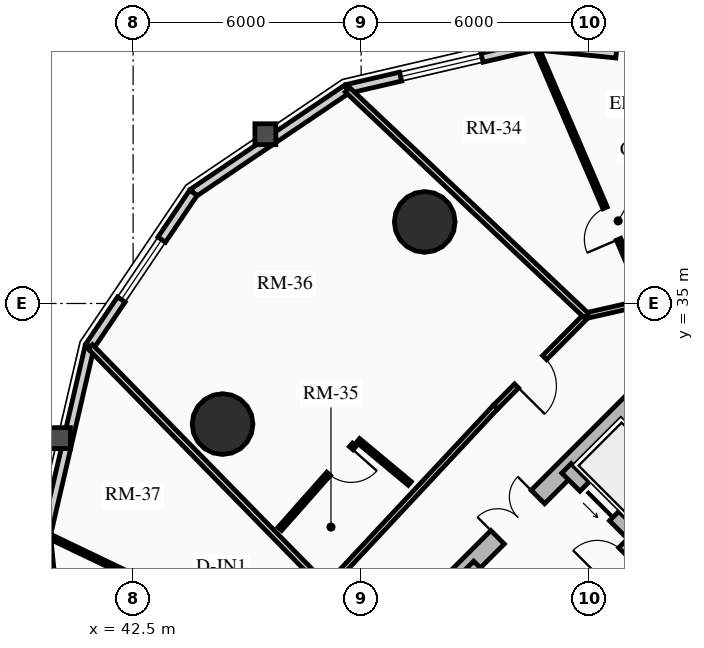
"""IFC4 building model, lengths in metres.
Left out: names, types, materials, properties, quantities, classifications, styles, units other than length and angle.
Written with IfcOpenShell. Run it as: python <this file> out.ifc"""

import sys

from ifc_helpers import new_model, si_unit, direction, frame, frame_2d, origin, origin_2d, place, context, subcontext, project, spatial, rectangle, circle, extrude, source, transform, mapped, element, fill, save


model = new_model("IFC4")
c1 = context("Model", 3, precision=1e-05, world=origin(), true_north=direction((0.0, 1.0)))
c2 = subcontext(c1, "Body", "Model", "MODEL_VIEW")
j1 = project(units=[si_unit("LENGTHUNIT", "METRE"), si_unit("PLANEANGLEUNIT", "RADIAN")], contexts=[c1])
p1 = place(None, origin())
s1 = spatial("IfcSite", under=j1, at=p1, CompositionType="ELEMENT")
p2 = place(p1, origin())
s2 = spatial("IfcBuilding", under=s1, at=p2, CompositionType="ELEMENT")
p3 = place(p2, frame((0.0, 0.0, 33.64)))
s3 = spatial("IfcBuildingStorey", under=s2, at=p3, CompositionType="ELEMENT", Elevation=33.64)
p4 = place(p3, frame((48.838, 25.596, 0.0), z_axis=(0.0, 0.0, 1.0), x_axis=(0.707106781187, 0.707106781187, 0.0)))
e1 = element("IfcWall", 1, at=p4, inside=s3, PredefinedType="SHEAR", context=c2, shape_type="SweptSolid", body=[
    extrude(rectangle(XDim=10.7, YDim=0.5, at=frame_2d((5.35, 0.0))), origin(), (0.0, 0.0, 1.0), 2.91),
])
m1 = source(origin(), c2, "Body", "SweptSolid", [
    extrude(rectangle(XDim=1.5, YDim=2.02, at=frame_2d((0.75, 1.01))), frame((0.0, 0.26, 0.0), z_axis=(0.0, -1.0, 0.0), x_axis=(1.0, 0.0, 0.0)), (0.0, 0.0, 1.0), 0.52),
])
p5 = place(p4, frame((4.6, 0.0, 0.0)))
e2 = element("IfcOpeningElement", 2, at=p5, cuts=e1, PredefinedType="OPENING", context=c2, shape_type="MappedRepresentation", body=[
    mapped(m1, transform((0.0, 0.0, 0.0), x_axis=(1.0, 0.0, 0.0), y_axis=(0.0, 1.0, 0.0), z_axis=(0.0, 0.0, 1.0), scale=1.0)),
])
p6 = place(p3, frame((61.096, 18.338, 0.0), z_axis=(0.0, 0.0, 1.0), x_axis=(-0.707106781187, 0.707106781187, 0.0)))
e3 = element("IfcWall", 3, at=p6, inside=s3, PredefinedType="SHEAR", context=c2, shape_type="SweptSolid", body=[
    extrude(rectangle(XDim=13.8, YDim=0.35, at=frame_2d((6.9, 0.0))), origin(), (0.0, 0.0, 1.0), 2.91),
])
m2 = source(origin(), c2, "Body", "SweptSolid", [
    extrude(rectangle(XDim=1.1, YDim=2.015, at=frame_2d((0.55, 1.007))), frame((0.0, 0.185, 0.0), z_axis=(0.0, -1.0, 0.0), x_axis=(1.0, 0.0, 0.0)), (0.0, 0.0, 1.0), 0.37),
])
p7 = place(p6, frame((4.9, 0.0, 0.0)))
e4 = element("IfcOpeningElement", 4, at=p7, cuts=e3, PredefinedType="OPENING", context=c2, shape_type="MappedRepresentation", body=[
    mapped(m2, transform((0.0, 0.0, 0.0), x_axis=(1.0, 0.0, 0.0), y_axis=(0.0, 1.0, 0.0), z_axis=(0.0, 0.0, 1.0), scale=1.0)),
])
m3 = source(origin(), c2, "Body", "SweptSolid", [
    extrude(rectangle(XDim=1.15, YDim=2.02, at=frame_2d((0.575, 1.01))), frame((0.0, 0.185, 0.0), z_axis=(0.0, -1.0, 0.0), x_axis=(1.0, 0.0, 0.0)), (0.0, 0.0, 1.0), 0.37),
])
p8 = place(p6, frame((7.32, 0.0, 0.0)))
e5 = element("IfcOpeningElement", 5, at=p8, cuts=e3, PredefinedType="OPENING", context=c2, shape_type="MappedRepresentation", body=[
    mapped(m3, transform((0.0, 0.0, 0.0), x_axis=(1.0, 0.0, 0.0), y_axis=(0.0, 1.0, 0.0), z_axis=(0.0, 0.0, 1.0), scale=1.0)),
])
p9 = place(p3, frame((63.662, 20.904, 0.0), z_axis=(0.0, 0.0, 1.0), x_axis=(-0.707106781187, 0.707106781187, 0.0)))
e6 = element("IfcWall", 6, at=p9, inside=s3, PredefinedType="SHEAR", context=c2, shape_type="SweptSolid", body=[
    extrude(rectangle(XDim=13.8, YDim=0.35, at=frame_2d((6.9, 0.0))), origin(), (0.0, 0.0, 1.0), 2.91),
])
p10 = place(p9, frame((10.025, 0.0, 0.0)))
e7 = element("IfcOpeningElement", 7, at=p10, cuts=e6, PredefinedType="OPENING", context=c2, shape_type="MappedRepresentation", body=[
    mapped(m2, transform((0.0, 0.0, 0.0), x_axis=(1.0, 0.0, 0.0), y_axis=(0.0, 1.0, 0.0), z_axis=(0.0, 0.0, 1.0), scale=1.0)),
])
p11 = place(p9, frame((12.025, 0.0, 0.0)))
e8 = element("IfcOpeningElement", 8, at=p11, cuts=e6, PredefinedType="OPENING", context=c2, shape_type="MappedRepresentation", body=[
    mapped(m2, transform((0.0, 0.0, 0.0), x_axis=(1.0, 0.0, 0.0), y_axis=(0.0, 1.0, 0.0), z_axis=(0.0, 0.0, 1.0), scale=1.0)),
])
p12 = place(p9, frame((5.33, 0.0, 0.0)))
e9 = element("IfcOpeningElement", 9, at=p12, cuts=e6, PredefinedType="OPENING", context=c2, shape_type="MappedRepresentation", body=[
    mapped(m3, transform((0.0, 0.0, 0.0), x_axis=(1.0, 0.0, 0.0), y_axis=(0.0, 1.0, 0.0), z_axis=(0.0, 0.0, 1.0), scale=1.0)),
])
for number, where, z_axis, x_axis in (
    (10, (50.173, 37.146, 0.0), (0.0, 0.0, 1.0), (1.0, 0.0, 0.0)),
    (11, (44.854, 31.827, 0.0), (0.0, 0.0, 1.0), (1.0, 0.0, 0.0)),
):
    element("IfcColumn", number, at=place(p3, frame(where, z_axis=z_axis, x_axis=x_axis)), inside=s3, PredefinedType="USERDEFINED", context=c2, shape_type="SweptSolid", body=[
        extrude(circle(Radius=0.8, at=origin_2d()), origin(), (0.0, 0.0, 1.0), 2.91),
    ])
p13 = place(p3, frame((53.09, 41.794, 0.0), z_axis=(0.0, 0.0, 1.0), x_axis=(0.994968263437, -0.100190592135, 0.0)))
e12 = element("IfcWall", 12, at=p13, inside=s3, PredefinedType="SOLIDWALL", context=c2, shape_type="SweptSolid", body=[
    extrude(rectangle(XDim=5.419, YDim=0.24, at=frame_2d((2.71, 0.0))), origin(), (0.0, 0.0, 1.0), 2.073),
])
m4 = source(origin(), c2, "Body", "SweptSolid", [
    extrude(rectangle(XDim=1.15, YDim=2.005, at=frame_2d((0.575, 1.002))), frame((0.0, 0.13, 0.0), z_axis=(0.0, -1.0, 0.0), x_axis=(1.0, 0.0, 0.0)), (0.0, 0.0, 1.0), 0.26),
])
p14 = place(p13, frame((2.135, 0.0, 0.0)))
e13 = element("IfcOpeningElement", 13, at=p14, cuts=e12, PredefinedType="OPENING", context=c2, shape_type="MappedRepresentation", body=[
    mapped(m4, transform((0.0, 0.0, 0.0), x_axis=(1.0, 0.0, 0.0), y_axis=(0.0, 1.0, 0.0), z_axis=(0.0, 0.0, 1.0), scale=1.0)),
])
p15 = place(p3, frame((48.129, 40.644, 0.0), z_axis=(0.0, 0.0, 1.0), x_axis=(0.974167686491, 0.22582585901, 0.0)))
e14 = element("IfcWall", 14, at=p15, inside=s3, PredefinedType="SOLIDWALL", context=c2, shape_type="SweptSolid", body=[
    extrude(rectangle(XDim=5.092, YDim=0.24, at=frame_2d((2.546, 0.0))), origin(), (0.0, 0.0, 1.0), 2.073),
])
m5 = source(origin(), c2, "Body", "SweptSolid", [
    extrude(rectangle(XDim=2.2, YDim=1.35, at=frame_2d((1.1, 0.675))), frame((0.0, 0.13, 0.0), z_axis=(0.0, -1.0, 0.0), x_axis=(1.0, 0.0, 0.0)), (0.0, 0.0, 1.0), 0.26),
])
p16 = place(p15, frame((1.446, 0.0, 0.65)))
e15 = element("IfcOpeningElement", 15, at=p16, cuts=e14, PredefinedType="OPENING", context=c2, shape_type="MappedRepresentation", body=[
    mapped(m5, transform((0.0, 0.0, 0.0), x_axis=(1.0, 0.0, 0.0), y_axis=(0.0, 1.0, 0.0), z_axis=(0.0, 0.0, 1.0), scale=1.0)),
])
p17 = place(p3, frame((44.086, 37.914, 0.0), z_axis=(0.0, 0.0, 1.0), x_axis=(0.828748297084, 0.559621532896, 0.0)))
e16 = element("IfcWall", 16, at=p17, inside=s3, PredefinedType="SOLIDWALL", context=c2, shape_type="SweptSolid", body=[
    extrude(rectangle(XDim=4.879, YDim=0.24, at=frame_2d((2.439, 0.0))), origin(), (0.0, 0.0, 1.0), 2.073),
])
p18 = place(p3, frame((41.356, 33.871, 0.0), z_axis=(0.0, 0.0, 1.0), x_axis=(0.559621532896, 0.828748297084, 0.0)))
e17 = element("IfcWall", 17, at=p18, inside=s3, PredefinedType="SOLIDWALL", context=c2, shape_type="SweptSolid", body=[
    extrude(rectangle(XDim=4.879, YDim=0.24, at=frame_2d((2.439, 0.0))), origin(), (0.0, 0.0, 1.0), 2.073),
])
m6 = source(origin(), c2, "Body", "SweptSolid", [
    extrude(rectangle(XDim=1.9, YDim=1.35, at=frame_2d((0.95, 0.675))), frame((0.0, 0.13, 0.0), z_axis=(0.0, -1.0, 0.0), x_axis=(1.0, 0.0, 0.0)), (0.0, 0.0, 1.0), 0.26),
])
p19 = place(p18, frame((1.489, 0.0, 0.65)))
e18 = element("IfcOpeningElement", 18, at=p19, cuts=e17, PredefinedType="OPENING", context=c2, shape_type="MappedRepresentation", body=[
    mapped(m6, transform((0.0, 0.0, 0.0), x_axis=(1.0, 0.0, 0.0), y_axis=(0.0, 1.0, 0.0), z_axis=(0.0, 0.0, 1.0), scale=1.0)),
])
p20 = place(p3, frame((40.206, 28.91, 0.0), z_axis=(0.0, 0.0, 1.0), x_axis=(0.22582585901, 0.974167686491, 0.0)))
e19 = element("IfcWall", 19, at=p20, inside=s3, PredefinedType="SOLIDWALL", context=c2, shape_type="SweptSolid", body=[
    extrude(rectangle(XDim=5.092, YDim=0.24, at=frame_2d((2.546, 0.0))), origin(), (0.0, 0.0, 1.0), 2.073),
])
p21 = place(p3, frame((40.749, 23.518, 0.0), z_axis=(0.0, 0.0, 1.0), x_axis=(-0.100190592135, 0.994968263437, 0.0)))
e20 = element("IfcWall", 20, at=p21, inside=s3, PredefinedType="SOLIDWALL", context=c2, shape_type="SweptSolid", body=[
    extrude(rectangle(XDim=5.419, YDim=0.24, at=frame_2d((2.71, 0.0))), origin(), (0.0, 0.0, 1.0), 2.073),
])
p22 = place(p21, frame((1.76, 0.0, 0.65)))
e21 = element("IfcOpeningElement", 21, at=p22, cuts=e20, PredefinedType="OPENING", context=c2, shape_type="MappedRepresentation", body=[
    mapped(m6, transform((0.0, 0.0, 0.0), x_axis=(1.0, 0.0, 0.0), y_axis=(0.0, 1.0, 0.0), z_axis=(0.0, 0.0, 1.0), scale=1.0)),
])
p23 = place(p3, frame((53.264, 26.416, 0.0), z_axis=(0.0, 0.0, 1.0), x_axis=(0.707106781187, 0.707106781187, 0.0)))
e22 = element("IfcWall", 22, at=p23, inside=s3, PredefinedType="PARTITIONING", context=c2, shape_type="SweptSolid", body=[
    extrude(rectangle(XDim=3.28, YDim=0.2, at=frame_2d((1.64, 0.0))), origin(), (0.0, 0.0, 1.0), 2.635),
])
m7 = source(origin(), c2, "Body", "SweptSolid", [
    extrude(rectangle(XDim=1.0, YDim=2.015, at=frame_2d((0.5, 1.007))), frame((0.0, 0.11, 0.0), z_axis=(0.0, -1.0, 0.0), x_axis=(1.0, 0.0, 0.0)), (0.0, 0.0, 1.0), 0.22),
])
p24 = place(p23, frame((0.14, 0.0, 0.0)))
e23 = element("IfcOpeningElement", 23, at=p24, cuts=e22, PredefinedType="OPENING", context=c2, shape_type="MappedRepresentation", body=[
    mapped(m7, transform((0.0, 0.0, 0.0), x_axis=(1.0, 0.0, 0.0), y_axis=(0.0, 1.0, 0.0), z_axis=(0.0, 0.0, 1.0), scale=1.0)),
])
m8 = source(origin(), c2, "Body", "SweptSolid", [
    extrude(rectangle(XDim=0.9, YDim=2.005, at=frame_2d((0.45, 1.002))), frame((0.0, 0.11, 0.0), z_axis=(0.0, -1.0, 0.0), x_axis=(1.0, 0.0, 0.0)), (0.0, 0.0, 1.0), 0.22),
])
p25 = place(p23, frame((2.05, 0.0, 0.0)))
e24 = element("IfcOpeningElement", 24, at=p25, cuts=e22, PredefinedType="OPENING", context=c2, shape_type="MappedRepresentation", body=[
    mapped(m8, transform((0.0, 0.0, 0.0), x_axis=(1.0, 0.0, 0.0), y_axis=(0.0, 1.0, 0.0), z_axis=(0.0, 0.0, 1.0), scale=1.0)),
])
p26 = place(p3, frame((55.984, 35.035, 0.0), z_axis=(0.0, 0.0, 1.0), x_axis=(-0.975290305708, -0.22092718165, 0.0)))
e25 = element("IfcWall", 25, at=p26, inside=s3, PredefinedType="PARTITIONING", context=c2, shape_type="SweptSolid", body=[
    extrude(rectangle(XDim=1.597, YDim=0.15, at=frame_2d((0.798, 0.0))), origin(), (0.0, 0.0, 1.0), 2.205),
])
p27 = place(p3, frame((54.427, 34.683, 0.0), z_axis=(0.0, 0.0, 1.0), x_axis=(-0.704178989986, -0.710022499687, 0.0)))
e26 = element("IfcWall", 26, at=p27, inside=s3, PredefinedType="PARTITIONING", context=c2, shape_type="SweptSolid", body=[
    extrude(rectangle(XDim=3.384, YDim=0.15, at=frame_2d((1.692, 0.0))), origin(), (0.0, 0.0, 1.0), 2.159),
])
m9 = source(origin(), c2, "Body", "SweptSolid", [
    extrude(rectangle(XDim=1.05, YDim=2.015, at=frame_2d((0.525, 1.007))), frame((0.0, 0.085, 0.0), z_axis=(0.0, -1.0, 0.0), x_axis=(1.0, 0.0, 0.0)), (0.0, 0.0, 1.0), 0.17),
])
p28 = place(p27, frame((1.56, 0.0, 0.0)))
e27 = element("IfcOpeningElement", 27, at=p28, cuts=e26, PredefinedType="OPENING", context=c2, shape_type="MappedRepresentation", body=[
    mapped(m9, transform((0.0, 0.0, 0.0), x_axis=(1.0, 0.0, 0.0), y_axis=(0.0, 1.0, 0.0), z_axis=(0.0, 0.0, 1.0), scale=1.0)),
])
p29 = place(p3, frame((52.043, 32.28, 0.0), z_axis=(0.0, 0.0, 1.0), x_axis=(-0.682606081633, -0.730786519661, 0.0)))
e28 = element("IfcWall", 28, at=p29, inside=s3, PredefinedType="PARTITIONING", context=c2, shape_type="SweptSolid", body=[
    extrude(rectangle(XDim=6.527, YDim=0.15, at=frame_2d((3.263, 0.0))), origin(), (0.0, 0.0, 1.0), 2.159),
])
p30 = place(p3, frame((54.427, 34.683, 0.0), z_axis=(0.0, 0.0, 1.0), x_axis=(-0.726732956694, 0.686920089716, 0.0)))
e29 = element("IfcWall", 29, at=p30, inside=s3, PredefinedType="PARTITIONING", context=c2, shape_type="SweptSolid", body=[
    extrude(rectangle(XDim=8.653, YDim=0.16, at=frame_2d((4.326, 0.0))), origin(), (0.0, 0.0, 1.0), 2.073),
])
p31 = place(p3, frame((47.588, 27.51, 0.0), z_axis=(0.0, 0.0, 1.0), x_axis=(-0.699371977892, 0.714757886657, 0.0)))
e30 = element("IfcWall", 30, at=p31, inside=s3, PredefinedType="PARTITIONING", context=c2, shape_type="SweptSolid", body=[
    extrude(rectangle(XDim=8.886, YDim=0.16, at=frame_2d((4.443, 0.0))), origin(), (0.0, 0.0, 1.0), 2.073),
])
p32 = place(p3, frame((55.984, 35.035, 0.0), z_axis=(0.0, 0.0, 1.0), x_axis=(-0.394244760106, 0.919005478291, 0.0)))
e31 = element("IfcWall", 31, at=p32, inside=s3, PredefinedType="PARTITIONING", context=c2, shape_type="SweptSolid", body=[
    extrude(rectangle(XDim=7.333, YDim=0.125, at=frame_2d((3.667, 0.0))), origin(), (0.0, 0.0, 1.0), 2.073),
])
m10 = source(origin(), c2, "Body", "SweptSolid", [
    extrude(rectangle(XDim=0.9, YDim=2.005, at=frame_2d((0.45, 1.002))), frame((0.0, 0.073, 0.0), z_axis=(0.0, -1.0, 0.0), x_axis=(1.0, 0.0, 0.0)), (0.0, 0.0, 1.0), 0.145),
])
p33 = place(p32, frame((1.8, 0.0, 0.0)))
e32 = element("IfcOpeningElement", 32, at=p33, cuts=e31, PredefinedType="OPENING", context=c2, shape_type="MappedRepresentation", body=[
    mapped(m10, transform((0.0, 0.0, 0.0), x_axis=(1.0, 0.0, 0.0), y_axis=(0.0, 1.0, 0.0), z_axis=(0.0, 0.0, 1.0), scale=1.0)),
])
p34 = place(p3, frame((49.78, 30.264, 0.0), z_axis=(0.0, 0.0, 1.0), x_axis=(-0.768209972595, 0.640197967824, 0.0)))
e33 = element("IfcWall", 33, at=p34, inside=s3, PredefinedType="PARTITIONING", context=c2, shape_type="SweptSolid", body=[
    extrude(rectangle(XDim=1.77, YDim=0.125, at=frame_2d((0.885, 0.0))), origin(), (0.0, 0.0, 1.0), 2.635),
])
p35 = place(p3, frame((48.318, 31.282, 0.0), z_axis=(0.0, 0.0, 1.0), x_axis=(-0.662365127428, -0.749181178333, 0.0)))
e34 = element("IfcWall", 34, at=p35, inside=s3, PredefinedType="PARTITIONING", context=c2, shape_type="SweptSolid", body=[
    extrude(rectangle(XDim=2.953, YDim=0.125, at=frame_2d((1.477, 0.0))), origin(), (0.0, 0.0, 1.0), 2.159),
])
p36 = place(p35, frame((0.12, 0.0, 0.0)))
e35 = element("IfcOpeningElement", 35, at=p36, cuts=e34, PredefinedType="OPENING", context=c2, shape_type="MappedRepresentation", body=[
    mapped(m10, transform((0.0, 0.0, 0.0), x_axis=(1.0, 0.0, 0.0), y_axis=(0.0, 1.0, 0.0), z_axis=(0.0, 0.0, 1.0), scale=1.0)),
])
p37 = place(p3, frame((46.543, 25.882, 0.0), z_axis=(0.0, 0.0, 1.0), x_axis=(-0.901937110034, 0.431867398103, 0.0)))
e36 = element("IfcWall", 36, at=p37, inside=s3, PredefinedType="PARTITIONING", context=c2, shape_type="SweptSolid", body=[
    extrude(rectangle(XDim=7.004, YDim=0.125, at=frame_2d((3.502, 0.0))), origin(), (0.0, 0.0, 1.0), 2.073),
])
p38 = place(p37, frame((1.8, 0.0, 0.0)))
e37 = element("IfcOpeningElement", 37, at=p38, cuts=e36, PredefinedType="OPENING", context=c2, shape_type="MappedRepresentation", body=[
    mapped(m10, transform((0.0, 0.0, 0.0), x_axis=(1.0, 0.0, 0.0), y_axis=(0.0, 1.0, 0.0), z_axis=(0.0, 0.0, 1.0), scale=1.0)),
])
m11 = source(origin(), c2, "Body", "SweptSolid", [
    extrude(rectangle(XDim=1.15, YDim=2.005, at=frame_2d((0.575, 1.002))), frame((0.0, 0.025, 0.0), z_axis=(0.0, -1.0, 0.0), x_axis=(1.0, 0.0, 0.0)), (0.0, 0.0, 1.0), 0.05),
])
p39 = place(p14, origin())
e38 = element("IfcDoor", 38, at=p39, inside=s3, OperationType="SINGLE_SWING_LEFT", PredefinedType="DOOR", context=c2, shape_type="MappedRepresentation", body=[
    mapped(m11, transform((0.0, 0.0, 0.0), x_axis=(1.0, 0.0, 0.0), y_axis=(0.0, 1.0, 0.0), z_axis=(0.0, 0.0, 1.0), scale=1.0)),
])
fill(e13, e38)
m12 = source(origin(), c2, "Body", "SweptSolid", [
    extrude(rectangle(XDim=2.2, YDim=1.35, at=frame_2d((1.1, 0.675))), frame((0.0, 0.03, 0.0), z_axis=(0.0, -1.0, 0.0), x_axis=(1.0, 0.0, 0.0)), (0.0, 0.0, 1.0), 0.06),
])
p40 = place(p16, origin())
e39 = element("IfcWindow", 39, at=p40, inside=s3, PartitioningType="DOUBLE_PANEL_VERTICAL", PredefinedType="WINDOW", context=c2, shape_type="MappedRepresentation", body=[
    mapped(m12, transform((0.0, 0.0, 0.0), x_axis=(1.0, 0.0, 0.0), y_axis=(0.0, 1.0, 0.0), z_axis=(0.0, 0.0, 1.0), scale=1.0)),
])
fill(e15, e39)
m13 = source(origin(), c2, "Body", "SweptSolid", [
    extrude(rectangle(XDim=1.9, YDim=1.35, at=frame_2d((0.95, 0.675))), frame((0.0, 0.03, 0.0), z_axis=(0.0, -1.0, 0.0), x_axis=(1.0, 0.0, 0.0)), (0.0, 0.0, 1.0), 0.06),
])
p41 = place(p19, origin())
e40 = element("IfcWindow", 40, at=p41, inside=s3, PartitioningType="DOUBLE_PANEL_VERTICAL", PredefinedType="WINDOW", context=c2, shape_type="MappedRepresentation", body=[
    mapped(m13, transform((0.0, 0.0, 0.0), x_axis=(1.0, 0.0, 0.0), y_axis=(0.0, 1.0, 0.0), z_axis=(0.0, 0.0, 1.0), scale=1.0)),
])
fill(e18, e40)
m14 = source(origin(), c2, "Body", "SweptSolid", [
    extrude(rectangle(XDim=1.1, YDim=2.015, at=frame_2d((0.55, 1.007))), frame((0.0, 0.025, 0.0), z_axis=(0.0, -1.0, 0.0), x_axis=(1.0, 0.0, 0.0)), (0.0, 0.0, 1.0), 0.05),
])
p42 = place(p11, origin())
e41 = element("IfcDoor", 41, at=p42, inside=s3, OperationType="SLIDING_TO_LEFT", PredefinedType="DOOR", context=c2, shape_type="MappedRepresentation", body=[
    mapped(m14, transform((0.0, 0.0, 0.0), x_axis=(1.0, 0.0, 0.0), y_axis=(0.0, 1.0, 0.0), z_axis=(0.0, 0.0, 1.0), scale=1.0)),
])
fill(e8, e41)
m15 = source(origin(), c2, "Body", "SweptSolid", [
    extrude(rectangle(XDim=1.5, YDim=2.02, at=frame_2d((0.75, 1.01))), frame((0.0, 0.025, 0.0), z_axis=(0.0, -1.0, 0.0), x_axis=(1.0, 0.0, 0.0)), (0.0, 0.0, 1.0), 0.05),
])
p43 = place(p5, origin())
e42 = element("IfcDoor", 42, at=p43, inside=s3, OperationType="DOUBLE_DOOR_SINGLE_SWING", PredefinedType="DOOR", context=c2, shape_type="MappedRepresentation", body=[
    mapped(m15, transform((0.0, 0.0, 0.0), x_axis=(1.0, 0.0, 0.0), y_axis=(0.0, 1.0, 0.0), z_axis=(0.0, 0.0, 1.0), scale=1.0)),
])
fill(e2, e42)
m16 = source(origin(), c2, "Body", "SweptSolid", [
    extrude(rectangle(XDim=0.9, YDim=2.005, at=frame_2d((0.45, 1.002))), frame((0.0, 0.025, 0.0), z_axis=(0.0, -1.0, 0.0), x_axis=(1.0, 0.0, 0.0)), (0.0, 0.0, 1.0), 0.05),
])
p44 = place(p25, origin())
e43 = element("IfcDoor", 43, at=p44, inside=s3, OperationType="SINGLE_SWING_LEFT", PredefinedType="DOOR", context=c2, shape_type="MappedRepresentation", body=[
    mapped(m16, transform((0.0, 0.0, 0.0), x_axis=(1.0, 0.0, 0.0), y_axis=(0.0, 1.0, 0.0), z_axis=(0.0, 0.0, 1.0), scale=1.0)),
])
fill(e24, e43)
p45 = place(p33, origin())
e44 = element("IfcDoor", 44, at=p45, inside=s3, OperationType="SINGLE_SWING_LEFT", PredefinedType="DOOR", context=c2, shape_type="MappedRepresentation", body=[
    mapped(m16, transform((0.0, 0.0, 0.0), x_axis=(1.0, 0.0, 0.0), y_axis=(0.0, 1.0, 0.0), z_axis=(0.0, 0.0, 1.0), scale=1.0)),
])
fill(e32, e44)
m17 = source(origin(), c2, "Body", "SweptSolid", [
    extrude(rectangle(XDim=1.05, YDim=2.015, at=frame_2d((0.525, 1.007))), frame((0.0, 0.025, 0.0), z_axis=(0.0, -1.0, 0.0), x_axis=(1.0, 0.0, 0.0)), (0.0, 0.0, 1.0), 0.05),
])
p46 = place(p28, origin())
e45 = element("IfcDoor", 45, at=p46, inside=s3, OperationType="SINGLE_SWING_RIGHT", PredefinedType="DOOR", context=c2, shape_type="MappedRepresentation", body=[
    mapped(m17, transform((0.0, 0.0, 0.0), x_axis=(1.0, 0.0, 0.0), y_axis=(0.0, 1.0, 0.0), z_axis=(0.0, 0.0, 1.0), scale=1.0)),
])
fill(e27, e45)
p47 = place(p36, origin())
e46 = element("IfcDoor", 46, at=p47, inside=s3, OperationType="SINGLE_SWING_LEFT", PredefinedType="DOOR", context=c2, shape_type="MappedRepresentation", body=[
    mapped(m16, transform((0.0, 0.0, 0.0), x_axis=(1.0, 0.0, 0.0), y_axis=(0.0, 1.0, 0.0), z_axis=(0.0, 0.0, 1.0), scale=1.0)),
])
fill(e35, e46)
save(model, sys.argv[1])
